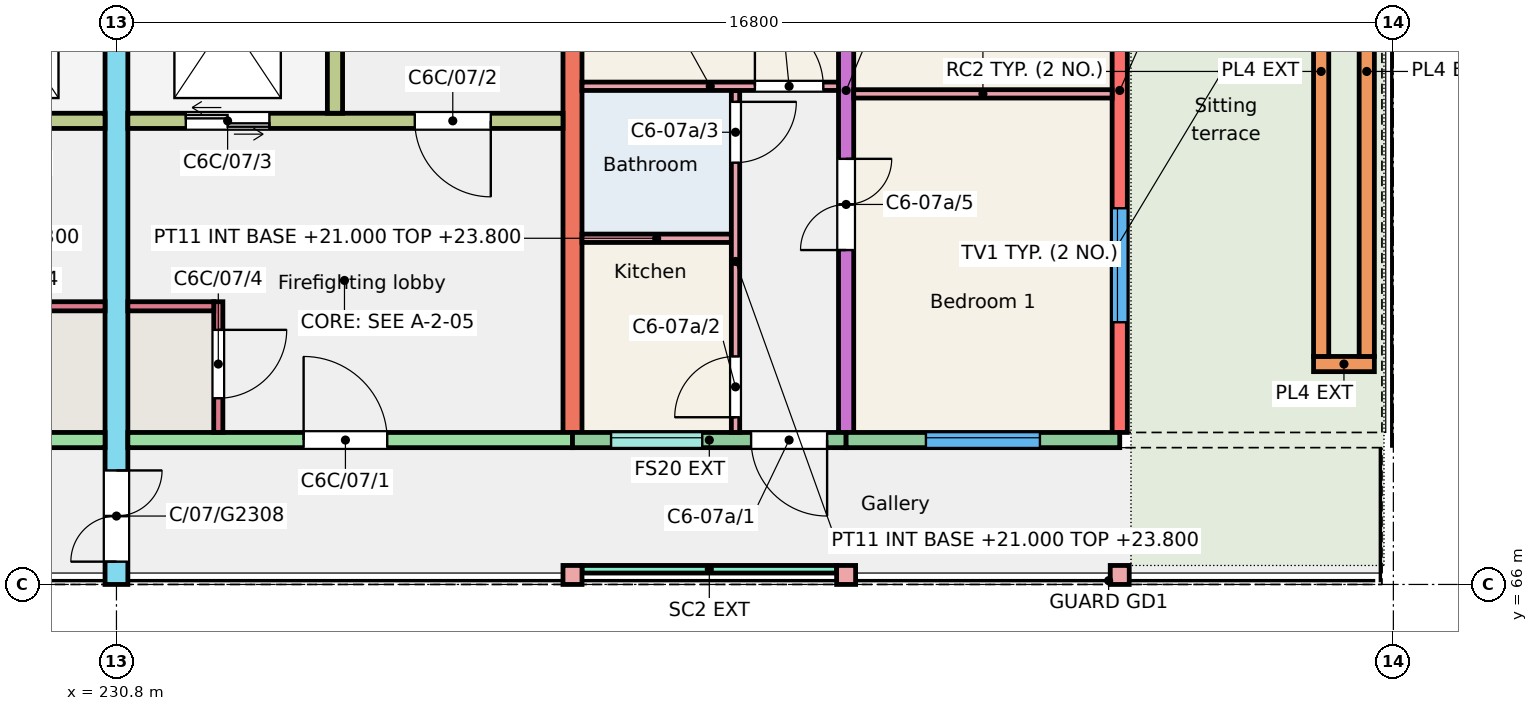
"""IFC4 building model, lengths in metres.
Left out: names, types, materials, properties, quantities, classifications, styles, units other than length and angle.
Written with IfcOpenShell. Run it as: python <this file> out.ifc"""

import sys

from ifc_helpers import new_model, si_unit, direction, frame, frame_2d, origin, origin_2d, place, context, subcontext, project, spatial, rectangle, extrude, element, fill, save


model = new_model("IFC4")
c1 = context("Model", 3, precision=1e-05, world=origin(), true_north=direction((0.0, 1.0)))
c2 = subcontext(c1, "Body", "Model", "MODEL_VIEW")
j1 = project(units=[si_unit("LENGTHUNIT", "METRE"), si_unit("PLANEANGLEUNIT", "RADIAN")], contexts=[c1])
p1 = place(None, origin())
s1 = spatial("IfcSite", under=j1, at=p1, CompositionType="ELEMENT")
p2 = place(p1, origin())
s2 = spatial("IfcBuilding", under=s1, at=p2, CompositionType="ELEMENT")
p3 = place(p2, frame((0.0, 0.0, 21.0)))
s3 = spatial("IfcBuildingStorey", under=s2, at=p3, CompositionType="ELEMENT", Elevation=21.0)
p4 = place(p3, frame((230.8, 66.0, 0.0), z_axis=(0.0, 0.0, 1.0), x_axis=(0.0, 1.0, 0.0)))
e1 = element("IfcWall", 1, at=p4, inside=s3, PredefinedType="SHEAR", context=c2, shape_type="SweptSolid", body=[
    extrude(rectangle(XDim=11.0, YDim=0.3, at=frame_2d((5.5, 0.0))), origin(), (0.0, 0.0, 1.0), 3.0),
])
p5 = place(p4, frame((0.3, 0.0, 0.0)))
e2 = element("IfcOpeningElement", 2, at=p5, cuts=e1, PredefinedType="OPENING", context=c2, shape_type="SweptSolid", body=[
    extrude(rectangle(XDim=1.2, YDim=2.1, at=frame_2d((0.6, 1.05))), frame((0.0, 0.16, 0.0), z_axis=(0.0, -1.0, 0.0), x_axis=(1.0, 0.0, 0.0)), (0.0, 0.0, 1.0), 0.32),
])
p6 = place(p3, frame((236.8, 68.0, 0.0), z_axis=(0.0, 0.0, 1.0), x_axis=(0.0, 1.0, 0.0)))
e3 = element("IfcWall", 3, at=p6, inside=s3, PredefinedType="SHEAR", context=c2, shape_type="SweptSolid", body=[
    extrude(rectangle(XDim=9.0, YDim=0.25, at=frame_2d((4.5, 0.0))), origin(), (0.0, 0.0, 1.0), 3.0),
])
p7 = place(p3, frame((240.4, 68.0, 0.0), z_axis=(0.0, 0.0, 1.0), x_axis=(0.0, 1.0, 0.0)))
e4 = element("IfcWall", 4, at=p7, inside=s3, PredefinedType="SHEAR", context=c2, shape_type="SweptSolid", body=[
    extrude(rectangle(XDim=9.0, YDim=0.2, at=frame_2d((4.5, 0.0))), origin(), (0.0, 0.0, 1.0), 3.0),
])
p8 = place(p7, frame((2.4, 0.0, 0.0)))
e5 = element("IfcOpeningElement", 5, at=p8, cuts=e4, PredefinedType="OPENING", context=c2, shape_type="SweptSolid", body=[
    extrude(rectangle(XDim=1.2, YDim=2.1, at=frame_2d((0.6, 1.05))), frame((0.0, 0.11, 0.0), z_axis=(0.0, -1.0, 0.0), x_axis=(1.0, 0.0, 0.0)), (0.0, 0.0, 1.0), 0.22),
])
p9 = place(p7, frame((6.4, 0.0, 0.0)))
e6 = element("IfcOpeningElement", 6, at=p9, cuts=e4, PredefinedType="OPENING", context=c2, shape_type="SweptSolid", body=[
    extrude(rectangle(XDim=1.2, YDim=2.1, at=frame_2d((0.6, 1.05))), frame((0.0, 0.11, 0.0), z_axis=(0.0, -1.0, 0.0), x_axis=(1.0, 0.0, 0.0)), (0.0, 0.0, 1.0), 0.22),
])
p10 = place(p3, frame((244.0, 68.0, 0.0), z_axis=(0.0, 0.0, 1.0), x_axis=(0.0, 1.0, 0.0)))
e7 = element("IfcWall", 7, at=p10, inside=s3, PredefinedType="SHEAR", context=c2, shape_type="SweptSolid", body=[
    extrude(rectangle(XDim=9.0, YDim=0.2, at=frame_2d((4.5, 0.0))), origin(), (0.0, 0.0, 1.0), 3.0),
])
p11 = place(p10, frame((1.45, 0.0, 0.9)))
e8 = element("IfcOpeningElement", 8, at=p11, cuts=e7, PredefinedType="OPENING", context=c2, shape_type="SweptSolid", body=[
    extrude(rectangle(XDim=1.5, YDim=1.5, at=frame_2d((0.75, 0.75))), frame((0.0, 0.11, 0.0), z_axis=(0.0, -1.0, 0.0), x_axis=(1.0, 0.0, 0.0)), (0.0, 0.0, 1.0), 0.22),
])
p12 = place(p10, frame((7.577, 0.0, 0.9)))
e9 = element("IfcOpeningElement", 9, at=p12, cuts=e7, PredefinedType="OPENING", context=c2, shape_type="SweptSolid", body=[
    extrude(rectangle(XDim=1.2, YDim=1.5, at=frame_2d((0.6, 0.75))), frame((0.0, 0.11, 0.0), z_axis=(0.0, -1.0, 0.0), x_axis=(1.0, 0.0, 0.0)), (0.0, 0.0, 1.0), 0.22),
])
p13 = place(p10, frame((6.255, 0.0, 0.0)))
e10 = element("IfcOpeningElement", 10, at=p13, cuts=e7, PredefinedType="OPENING", context=c2, shape_type="SweptSolid", body=[
    extrude(rectangle(XDim=1.0, YDim=2.1, at=frame_2d((0.5, 1.05))), frame((0.0, 0.11, 0.0), z_axis=(0.0, -1.0, 0.0), x_axis=(1.0, 0.0, 0.0)), (0.0, 0.0, 1.0), 0.22),
])
p14 = place(p3, frame((224.8, 67.9, 0.0), z_axis=(0.0, 0.0, 1.0), x_axis=(1.0, 0.0, 0.0)))
e11 = element("IfcWall", 11, at=p14, inside=s3, PredefinedType="SHEAR", context=c2, shape_type="SweptSolid", body=[
    extrude(rectangle(XDim=5.85, YDim=0.2, at=frame_2d((2.925, 0.0))), origin(), (0.0, 0.0, 1.0), 3.0),
])
p15 = place(p14, frame((2.438, 0.0, 0.0)))
e12 = element("IfcOpeningElement", 12, at=p15, cuts=e11, PredefinedType="OPENING", context=c2, shape_type="SweptSolid", body=[
    extrude(rectangle(XDim=1.1, YDim=2.1, at=frame_2d((0.55, 1.05))), frame((0.0, 0.11, 0.0), z_axis=(0.0, -1.0, 0.0), x_axis=(1.0, 0.0, 0.0)), (0.0, 0.0, 1.0), 0.22),
])
p16 = place(p3, frame((224.925, 72.1, 0.0), z_axis=(0.0, 0.0, 1.0), x_axis=(1.0, 0.0, 0.0)))
e13 = element("IfcWall", 13, at=p16, inside=s3, PredefinedType="SHEAR", context=c2, shape_type="SweptSolid", body=[
    extrude(rectangle(XDim=5.725, YDim=0.2, at=frame_2d((2.862, 0.0))), origin(), (0.0, 0.0, 1.0), 3.0),
])
p17 = place(p16, frame((0.95, 0.0, 0.0)))
e14 = element("IfcOpeningElement", 14, at=p17, cuts=e13, PredefinedType="OPENING", context=c2, shape_type="SweptSolid", body=[
    extrude(rectangle(XDim=1.0, YDim=2.1, at=frame_2d((0.5, 1.05))), frame((0.0, 0.11, 0.0), z_axis=(0.0, -1.0, 0.0), x_axis=(1.0, 0.0, 0.0)), (0.0, 0.0, 1.0), 0.22),
])
p18 = place(p16, frame((3.863, 0.0, 0.0)))
e15 = element("IfcOpeningElement", 15, at=p18, cuts=e13, PredefinedType="OPENING", context=c2, shape_type="SweptSolid", body=[
    extrude(rectangle(XDim=1.1, YDim=2.1, at=frame_2d((0.55, 1.05))), frame((0.0, 0.11, 0.0), z_axis=(0.0, -1.0, 0.0), x_axis=(1.0, 0.0, 0.0)), (0.0, 0.0, 1.0), 0.22),
])
p19 = place(p3, frame((229.52, 69.66, 0.0), z_axis=(0.0, 0.0, 1.0), x_axis=(1.0, 0.0, 0.0)))
e16 = element("IfcWall", 16, at=p19, inside=s3, PredefinedType="SHEAR", context=c2, shape_type="SweptSolid", body=[
    extrude(rectangle(XDim=1.13, YDim=0.12, at=frame_2d((0.565, 0.0))), origin(), (0.0, 0.0, 1.0), 3.0),
])
p20 = place(p3, frame((230.95, 67.9, 0.0), z_axis=(0.0, 0.0, 1.0), x_axis=(1.0, 0.0, 0.0)))
e17 = element("IfcWall", 17, at=p20, inside=s3, PredefinedType="SHEAR", context=c2, shape_type="SweptSolid", body=[
    extrude(rectangle(XDim=5.85, YDim=0.2, at=frame_2d((2.925, 0.0))), origin(), (0.0, 0.0, 1.0), 3.0),
])
p21 = place(p20, frame((2.312, 0.0, 0.0)))
e18 = element("IfcOpeningElement", 18, at=p21, cuts=e17, PredefinedType="OPENING", context=c2, shape_type="SweptSolid", body=[
    extrude(rectangle(XDim=1.1, YDim=2.1, at=frame_2d((0.55, 1.05))), frame((0.0, 0.11, 0.0), z_axis=(0.0, -1.0, 0.0), x_axis=(1.0, 0.0, 0.0)), (0.0, 0.0, 1.0), 0.22),
])
p22 = place(p3, frame((230.95, 72.1, 0.0), z_axis=(0.0, 0.0, 1.0), x_axis=(1.0, 0.0, 0.0)))
e19 = element("IfcWall", 19, at=p22, inside=s3, PredefinedType="SHEAR", context=c2, shape_type="SweptSolid", body=[
    extrude(rectangle(XDim=5.725, YDim=0.2, at=frame_2d((2.863, 0.0))), origin(), (0.0, 0.0, 1.0), 3.0),
])
p23 = place(p22, frame((3.775, 0.0, 0.0)))
e20 = element("IfcOpeningElement", 20, at=p23, cuts=e19, PredefinedType="OPENING", context=c2, shape_type="SweptSolid", body=[
    extrude(rectangle(XDim=1.0, YDim=2.1, at=frame_2d((0.5, 1.05))), frame((0.0, 0.11, 0.0), z_axis=(0.0, -1.0, 0.0), x_axis=(1.0, 0.0, 0.0)), (0.0, 0.0, 1.0), 0.22),
])
p24 = place(p22, frame((0.762, 0.0, 0.0)))
e21 = element("IfcOpeningElement", 21, at=p24, cuts=e19, PredefinedType="OPENING", context=c2, shape_type="SweptSolid", body=[
    extrude(rectangle(XDim=1.1, YDim=2.1, at=frame_2d((0.55, 1.05))), frame((0.0, 0.11, 0.0), z_axis=(0.0, -1.0, 0.0), x_axis=(1.0, 0.0, 0.0)), (0.0, 0.0, 1.0), 0.22),
])
p25 = place(p3, frame((233.675, 72.2, 0.0), z_axis=(0.0, 0.0, 1.0), x_axis=(0.0, 1.0, 0.0)))
e22 = element("IfcWall", 22, at=p25, inside=s3, PredefinedType="SHEAR", context=c2, shape_type="SweptSolid", body=[
    extrude(rectangle(XDim=4.8, YDim=0.2, at=frame_2d((2.4, 0.0))), origin(), (0.0, 0.0, 1.0), 3.0),
])
p26 = place(p3, frame((232.14, 68.0, 0.0), z_axis=(0.0, 0.0, 1.0), x_axis=(0.0, 1.0, 0.0)))
e23 = element("IfcWall", 23, at=p26, inside=s3, PredefinedType="SHEAR", context=c2, shape_type="SweptSolid", body=[
    extrude(rectangle(XDim=1.72, YDim=0.12, at=frame_2d((0.86, 0.0))), origin(), (0.0, 0.0, 1.0), 3.0),
])
p27 = place(p26, frame((0.45, 0.0, 0.0)))
e24 = element("IfcOpeningElement", 24, at=p27, cuts=e23, PredefinedType="OPENING", context=c2, shape_type="SweptSolid", body=[
    extrude(rectangle(XDim=0.9, YDim=2.1, at=frame_2d((0.45, 1.05))), frame((0.0, 0.07, 0.0), z_axis=(0.0, -1.0, 0.0), x_axis=(1.0, 0.0, 0.0)), (0.0, 0.0, 1.0), 0.14),
])
p28 = place(p3, frame((230.95, 69.66, 0.0), z_axis=(0.0, 0.0, 1.0), x_axis=(1.0, 0.0, 0.0)))
e25 = element("IfcWall", 25, at=p28, inside=s3, PredefinedType="SHEAR", context=c2, shape_type="SweptSolid", body=[
    extrude(rectangle(XDim=1.13, YDim=0.12, at=frame_2d((0.565, 0.0))), origin(), (0.0, 0.0, 1.0), 3.0),
])
p29 = place(p3, frame((236.8, 67.9, 0.0), z_axis=(0.0, 0.0, 1.0), x_axis=(1.0, 0.0, 0.0)))
e26 = element("IfcWall", 26, at=p29, inside=s3, PredefinedType="SOLIDWALL", context=c2, shape_type="SweptSolid", body=[
    extrude(rectangle(XDim=3.6, YDim=0.2, at=frame_2d((1.8, 0.0))), origin(), (0.0, 0.0, 1.0), 3.0),
])
p30 = place(p29, frame((0.508, 0.0, 1.1)))
e27 = element("IfcOpeningElement", 27, at=p30, cuts=e26, PredefinedType="OPENING", context=c2, shape_type="SweptSolid", body=[
    extrude(rectangle(XDim=1.2, YDim=1.3, at=frame_2d((0.6, 0.65))), frame((0.0, 0.11, 0.0), z_axis=(0.0, -1.0, 0.0), x_axis=(1.0, 0.0, 0.0)), (0.0, 0.0, 1.0), 0.22),
])
p31 = place(p29, frame((2.35, 0.0, 0.0)))
e28 = element("IfcOpeningElement", 28, at=p31, cuts=e26, PredefinedType="OPENING", context=c2, shape_type="SweptSolid", body=[
    extrude(rectangle(XDim=1.0, YDim=2.1, at=frame_2d((0.5, 1.05))), frame((0.0, 0.11, 0.0), z_axis=(0.0, -1.0, 0.0), x_axis=(1.0, 0.0, 0.0)), (0.0, 0.0, 1.0), 0.22),
])
p32 = place(p3, frame((240.4, 67.9, 0.0), z_axis=(0.0, 0.0, 1.0), x_axis=(1.0, 0.0, 0.0)))
e29 = element("IfcWall", 29, at=p32, inside=s3, PredefinedType="SOLIDWALL", context=c2, shape_type="SweptSolid", body=[
    extrude(rectangle(XDim=3.6, YDim=0.2, at=frame_2d((1.8, 0.0))), origin(), (0.0, 0.0, 1.0), 3.0),
])
p33 = place(p32, frame((1.05, 0.0, 0.9)))
e30 = element("IfcOpeningElement", 30, at=p33, cuts=e29, PredefinedType="OPENING", context=c2, shape_type="SweptSolid", body=[
    extrude(rectangle(XDim=1.5, YDim=1.5, at=frame_2d((0.75, 0.75))), frame((0.0, 0.11, 0.0), z_axis=(0.0, -1.0, 0.0), x_axis=(1.0, 0.0, 0.0)), (0.0, 0.0, 1.0), 0.22),
])
for number, where, z_axis, x_axis in (
    (31, (236.8, 66.125, 0.0), (0.0, 0.0, 1.0), (1.0, 0.0, 0.0)),
    (32, (240.4, 66.125, 0.0), (0.0, 0.0, 1.0), (1.0, 0.0, 0.0)),
    (33, (244.0, 66.125, 0.0), (0.0, 0.0, 1.0), (1.0, 0.0, 0.0)),
):
    element("IfcColumn", number, at=place(p3, frame(where, z_axis=z_axis, x_axis=x_axis)), inside=s3, PredefinedType="COLUMN", context=c2, shape_type="SweptSolid", body=[
        extrude(rectangle(XDim=0.25, YDim=0.25, at=origin_2d()), origin(), (0.0, 0.0, 1.0), 3.0),
    ])
p34 = place(p3, frame((246.55, 68.9, 0.01), z_axis=(0.0, 0.0, 1.0), x_axis=(1.0, 0.0, 0.0)))
e34 = element("IfcWall", 34, at=p34, inside=s3, PredefinedType="SOLIDWALL", context=c2, shape_type="SweptSolid", body=[
    extrude(rectangle(XDim=0.8, YDim=0.2, at=frame_2d((0.4, 0.0))), origin(), (0.0, 0.0, 1.0), 0.45),
])
for number, where, z_axis, x_axis in (
    (35, (246.65, 69.0, 0.01), (0.0, 0.0, 1.0), (0.0, 1.0, 0.0)),
    (36, (247.25, 69.0, 0.01), (0.0, 0.0, 1.0), (0.0, 1.0, 0.0)),
):
    element("IfcWall", number, at=place(p3, frame(where, z_axis=z_axis, x_axis=x_axis)), inside=s3, PredefinedType="SOLIDWALL", context=c2, shape_type="SweptSolid", body=[
        extrude(rectangle(XDim=7.5, YDim=0.2, at=frame_2d((3.75, 0.0))), origin(), (0.0, 0.0, 1.0), 0.45),
    ])
p35 = place(p3, frame((236.925, 66.2, 0.0), z_axis=(0.0, 0.0, 1.0), x_axis=(1.0, 0.0, 0.0)))
e37 = element("IfcWall", 37, at=p35, inside=s3, PredefinedType="SOLIDWALL", context=c2, shape_type="SweptSolid", body=[
    extrude(rectangle(XDim=3.35, YDim=0.1, at=frame_2d((1.675, 0.0))), origin(), (0.0, 0.0, 1.0), 2.45),
])
p36 = place(p3, frame((236.925, 70.555, 0.0), z_axis=(0.0, 0.0, 1.0), x_axis=(1.0, 0.0, 0.0)))
e38 = element("IfcWall", 38, at=p36, inside=s3, PredefinedType="PARTITIONING", context=c2, shape_type="SweptSolid", body=[
    extrude(rectangle(XDim=1.965, YDim=0.11, at=frame_2d((0.982, 0.0))), origin(), (0.0, 0.0, 1.0), 2.8),
])
p37 = place(p3, frame((238.945, 68.0, 0.0), z_axis=(0.0, 0.0, 1.0), x_axis=(0.0, 1.0, 0.0)))
e39 = element("IfcWall", 39, at=p37, inside=s3, PredefinedType="PARTITIONING", context=c2, shape_type="SweptSolid", body=[
    extrude(rectangle(XDim=4.5, YDim=0.11, at=frame_2d((2.25, 0.0))), origin(), (0.0, 0.0, 1.0), 2.8),
])
p38 = place(p37, frame((0.2, 0.0, 0.0)))
e40 = element("IfcOpeningElement", 40, at=p38, cuts=e39, PredefinedType="OPENING", context=c2, shape_type="SweptSolid", body=[
    extrude(rectangle(XDim=0.8, YDim=2.1, at=frame_2d((0.4, 1.05))), frame((0.0, 0.065, 0.0), z_axis=(0.0, -1.0, 0.0), x_axis=(1.0, 0.0, 0.0)), (0.0, 0.0, 1.0), 0.13),
])
p39 = place(p37, frame((3.55, 0.0, 0.0)))
e41 = element("IfcOpeningElement", 41, at=p39, cuts=e39, PredefinedType="OPENING", context=c2, shape_type="SweptSolid", body=[
    extrude(rectangle(XDim=0.8, YDim=2.1, at=frame_2d((0.4, 1.05))), frame((0.0, 0.065, 0.0), z_axis=(0.0, -1.0, 0.0), x_axis=(1.0, 0.0, 0.0)), (0.0, 0.0, 1.0), 0.13),
])
p40 = place(p3, frame((236.925, 72.555, 0.0), z_axis=(0.0, 0.0, 1.0), x_axis=(1.0, 0.0, 0.0)))
e42 = element("IfcWall", 42, at=p40, inside=s3, PredefinedType="PARTITIONING", context=c2, shape_type="SweptSolid", body=[
    extrude(rectangle(XDim=3.375, YDim=0.11, at=frame_2d((1.688, 0.0))), origin(), (0.0, 0.0, 1.0), 2.8),
])
p41 = place(p40, frame((2.275, 0.0, 0.0)))
e43 = element("IfcOpeningElement", 43, at=p41, cuts=e42, PredefinedType="OPENING", context=c2, shape_type="SweptSolid", body=[
    extrude(rectangle(XDim=0.9, YDim=2.1, at=frame_2d((0.45, 1.05))), frame((0.0, 0.065, 0.0), z_axis=(0.0, -1.0, 0.0), x_axis=(1.0, 0.0, 0.0)), (0.0, 0.0, 1.0), 0.13),
])
p42 = place(p3, frame((240.5, 72.455, 0.0), z_axis=(0.0, 0.0, 1.0), x_axis=(1.0, 0.0, 0.0)))
e44 = element("IfcWall", 44, at=p42, inside=s3, PredefinedType="PARTITIONING", context=c2, shape_type="SweptSolid", body=[
    extrude(rectangle(XDim=3.4, YDim=0.11, at=frame_2d((1.7, 0.0))), origin(), (0.0, 0.0, 1.0), 2.75),
])
p43 = place(p33, origin())
e45 = element("IfcWindow", 45, at=p43, inside=s3, PartitioningType="SINGLE_PANEL", PredefinedType="WINDOW", context=c2, shape_type="SweptSolid", body=[
    extrude(rectangle(XDim=1.5, YDim=1.5, at=frame_2d((0.75, 0.75))), frame((0.0, 0.06, 0.0), z_axis=(0.0, -1.0, 0.0), x_axis=(1.0, 0.0, 0.0)), (0.0, 0.0, 1.0), 0.06),
])
fill(e30, e45)
p44 = place(p30, origin())
e46 = element("IfcWindow", 46, at=p44, inside=s3, PartitioningType="SINGLE_PANEL", PredefinedType="WINDOW", context=c2, shape_type="SweptSolid", body=[
    extrude(rectangle(XDim=1.2, YDim=1.3, at=frame_2d((0.6, 0.65))), frame((0.0, 0.06, 0.0), z_axis=(0.0, -1.0, 0.0), x_axis=(1.0, 0.0, 0.0)), (0.0, 0.0, 1.0), 0.06),
])
fill(e27, e46)
p45 = place(p11, origin())
e47 = element("IfcWindow", 47, at=p45, inside=s3, PartitioningType="SINGLE_PANEL", PredefinedType="WINDOW", context=c2, shape_type="SweptSolid", body=[
    extrude(rectangle(XDim=1.5, YDim=1.5, at=frame_2d((0.75, 0.75))), frame((0.0, 0.06, 0.0), z_axis=(0.0, -1.0, 0.0), x_axis=(1.0, 0.0, 0.0)), (0.0, 0.0, 1.0), 0.06),
])
fill(e8, e47)
p46 = place(p31, origin())
e48 = element("IfcDoor", 48, at=p46, inside=s3, OperationType="SINGLE_SWING_RIGHT", PredefinedType="DOOR", context=c2, shape_type="SweptSolid", body=[
    extrude(rectangle(XDim=1.0, YDim=2.1, at=frame_2d((0.5, 1.05))), frame((0.0, 0.025, 0.0), z_axis=(0.0, -1.0, 0.0), x_axis=(1.0, 0.0, 0.0)), (0.0, 0.0, 1.0), 0.05),
])
fill(e28, e48)
p47 = place(p38, origin())
e49 = element("IfcDoor", 49, at=p47, inside=s3, OperationType="SINGLE_SWING_LEFT", PredefinedType="DOOR", context=c2, shape_type="SweptSolid", body=[
    extrude(rectangle(XDim=0.8, YDim=2.1, at=frame_2d((0.4, 1.05))), frame((0.0, 0.025, 0.0), z_axis=(0.0, -1.0, 0.0), x_axis=(1.0, 0.0, 0.0)), (0.0, 0.0, 1.0), 0.05),
])
fill(e40, e49)
p48 = place(p39, origin())
e50 = element("IfcDoor", 50, at=p48, inside=s3, OperationType="SINGLE_SWING_RIGHT", PredefinedType="DOOR", context=c2, shape_type="SweptSolid", body=[
    extrude(rectangle(XDim=0.8, YDim=2.1, at=frame_2d((0.4, 1.05))), frame((0.0, 0.025, 0.0), z_axis=(0.0, -1.0, 0.0), x_axis=(1.0, 0.0, 0.0)), (0.0, 0.0, 1.0), 0.05),
])
fill(e41, e50)
p49 = place(p41, origin())
e51 = element("IfcDoor", 51, at=p49, inside=s3, OperationType="SINGLE_SWING_LEFT", PredefinedType="DOOR", context=c2, shape_type="SweptSolid", body=[
    extrude(rectangle(XDim=0.9, YDim=2.1, at=frame_2d((0.45, 1.05))), frame((0.0, 0.025, 0.0), z_axis=(0.0, -1.0, 0.0), x_axis=(1.0, 0.0, 0.0)), (0.0, 0.0, 1.0), 0.05),
])
fill(e43, e51)
p50 = place(p8, origin())
e52 = element("IfcDoor", 52, at=p50, inside=s3, OperationType="DOUBLE_DOOR_SINGLE_SWING", PredefinedType="DOOR", context=c2, shape_type="SweptSolid", body=[
    extrude(rectangle(XDim=1.2, YDim=2.1, at=frame_2d((0.6, 1.05))), frame((0.0, 0.025, 0.0), z_axis=(0.0, -1.0, 0.0), x_axis=(1.0, 0.0, 0.0)), (0.0, 0.0, 1.0), 0.05),
])
fill(e5, e52)
p51 = place(p21, origin())
e53 = element("IfcDoor", 53, at=p51, inside=s3, OperationType="SINGLE_SWING_LEFT", PredefinedType="DOOR", context=c2, shape_type="SweptSolid", body=[
    extrude(rectangle(XDim=1.1, YDim=2.1, at=frame_2d((0.55, 1.05))), frame((0.0, 0.025, 0.0), z_axis=(0.0, -1.0, 0.0), x_axis=(1.0, 0.0, 0.0)), (0.0, 0.0, 1.0), 0.05),
])
fill(e18, e53)
p52 = place(p23, origin())
e54 = element("IfcDoor", 54, at=p52, inside=s3, OperationType="SINGLE_SWING_RIGHT", PredefinedType="DOOR", context=c2, shape_type="SweptSolid", body=[
    extrude(rectangle(XDim=1.0, YDim=2.1, at=frame_2d((0.5, 1.05))), frame((0.0, 0.025, 0.0), z_axis=(0.0, -1.0, 0.0), x_axis=(1.0, 0.0, 0.0)), (0.0, 0.0, 1.0), 0.05),
])
fill(e20, e54)
p53 = place(p24, origin())
e55 = element("IfcDoor", 55, at=p53, inside=s3, OperationType="DOUBLE_DOOR_SLIDING", PredefinedType="DOOR", context=c2, shape_type="SweptSolid", body=[
    extrude(rectangle(XDim=1.1, YDim=2.1, at=frame_2d((0.55, 1.05))), frame((0.0, 0.025, 0.0), z_axis=(0.0, -1.0, 0.0), x_axis=(1.0, 0.0, 0.0)), (0.0, 0.0, 1.0), 0.05),
])
fill(e21, e55)
p54 = place(p27, origin())
e56 = element("IfcDoor", 56, at=p54, inside=s3, OperationType="SINGLE_SWING_RIGHT", PredefinedType="DOOR", context=c2, shape_type="SweptSolid", body=[
    extrude(rectangle(XDim=0.9, YDim=2.1, at=frame_2d((0.45, 1.05))), frame((0.0, 0.025, 0.0), z_axis=(0.0, -1.0, 0.0), x_axis=(1.0, 0.0, 0.0)), (0.0, 0.0, 1.0), 0.05),
])
fill(e24, e56)
p55 = place(p5, origin())
e57 = element("IfcDoor", 57, at=p55, inside=s3, OperationType="DOUBLE_DOOR_SINGLE_SWING", PredefinedType="DOOR", context=c2, shape_type="SweptSolid", body=[
    extrude(rectangle(XDim=1.2, YDim=2.1, at=frame_2d((0.6, 1.05))), frame((0.0, 0.025, 0.0), z_axis=(0.0, -1.0, 0.0), x_axis=(1.0, 0.0, 0.0)), (0.0, 0.0, 1.0), 0.05),
])
fill(e2, e57)
save(model, sys.argv[1])
